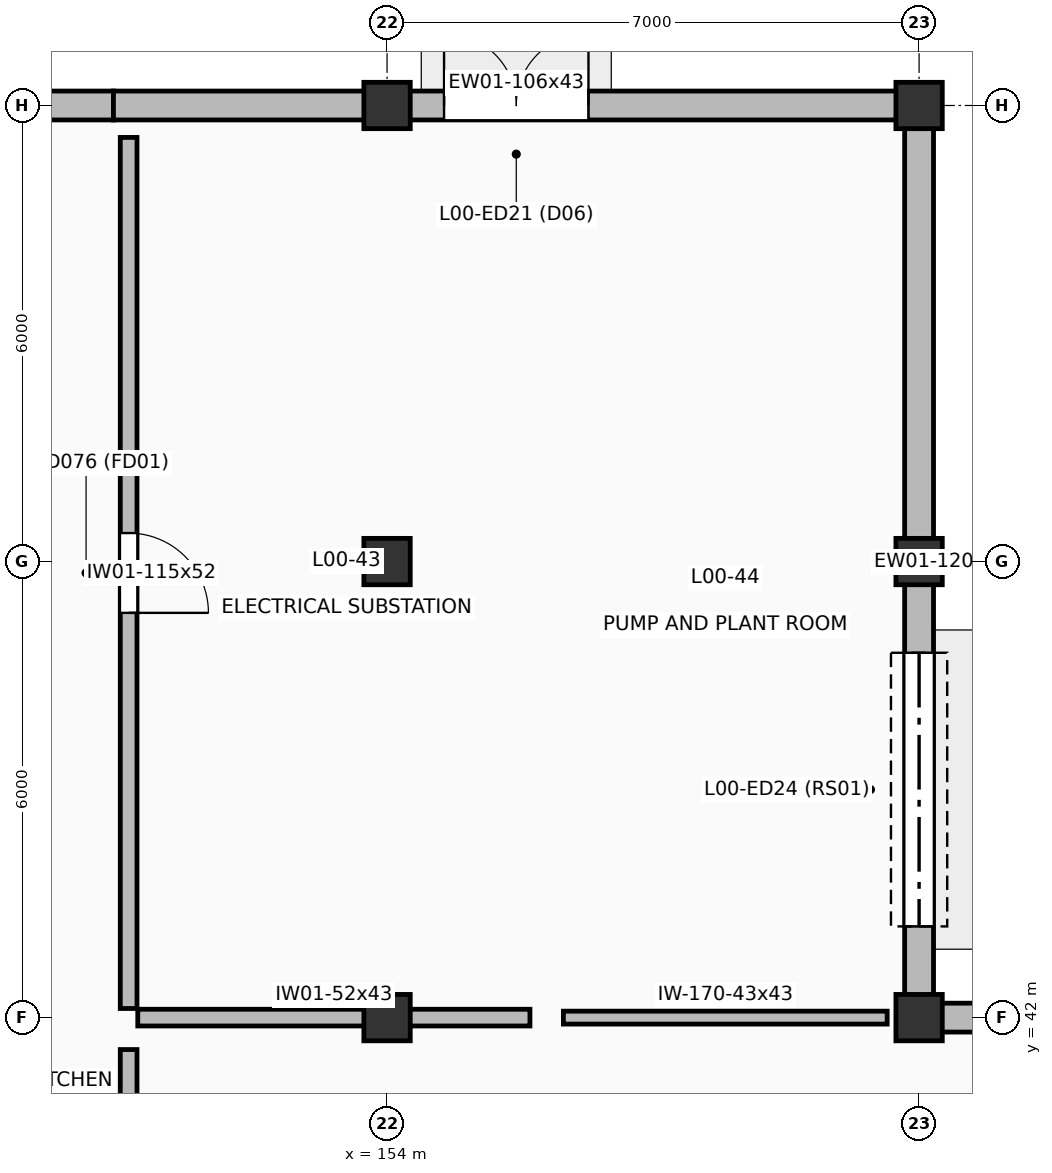
"""IFC4 building model, lengths in metres.
Left out: names, types, materials, properties, quantities, classifications, styles, units other than length and angle.
Written with IfcOpenShell. Run it as: python <this file> out.ifc"""

import sys

from ifc_helpers import new_model, si_unit, direction, frame, frame_2d, origin, origin_2d, place, context, subcontext, project, spatial, rectangle, extrude, element, fill, save


model = new_model("IFC4")
c1 = context("Model", 3, precision=1e-05, world=origin(), true_north=direction((0.0, 1.0)))
c2 = subcontext(c1, "Body", "Model", "MODEL_VIEW")
j1 = project(units=[si_unit("LENGTHUNIT", "METRE"), si_unit("PLANEANGLEUNIT", "RADIAN")], contexts=[c1])
p1 = place(None, origin())
s1 = spatial("IfcSite", under=j1, at=p1, CompositionType="ELEMENT")
p2 = place(p1, origin())
s2 = spatial("IfcBuilding", under=s1, at=p2, CompositionType="ELEMENT")
p3 = place(p2, origin())
s3 = spatial("IfcBuildingStorey", under=s2, at=p3, CompositionType="ELEMENT", Elevation=0.0)
for number, where, z_axis, x_axis in (
    (1, (154.0, 42.0, 0.0), (0.0, 0.0, 1.0), (1.0, 0.0, 0.0)),
    (2, (154.0, 48.0, 0.0), (0.0, 0.0, 1.0), (1.0, 0.0, 0.0)),
    (3, (154.0, 54.0, 0.0), (0.0, 0.0, 1.0), (1.0, 0.0, 0.0)),
    (4, (161.0, 42.0, 0.0), (0.0, 0.0, 1.0), (1.0, 0.0, 0.0)),
    (5, (161.0, 48.0, 0.0), (0.0, 0.0, 1.0), (1.0, 0.0, 0.0)),
    (6, (161.0, 54.0, 0.0), (0.0, 0.0, 1.0), (1.0, 0.0, 0.0)),
):
    element("IfcColumn", number, at=place(p3, frame(where, z_axis=z_axis, x_axis=x_axis)), inside=s3, PredefinedType="COLUMN", context=c2, shape_type="SweptSolid", body=[
        extrude(rectangle(XDim=0.61, YDim=0.61, at=origin_2d()), origin(), (0.0, 0.0, 1.0), 5.4),
    ])
p4 = place(p3, frame((140.0, 54.0, 0.0), z_axis=(0.0, 0.0, 1.0), x_axis=(1.0, 0.0, 0.0)))
e7 = element("IfcWall", 7, at=p4, inside=s3, PredefinedType="SOLIDWALL", context=c2, shape_type="SweptSolid", body=[
    extrude(rectangle(XDim=10.4, YDim=0.38, at=frame_2d((5.2, 0.0))), origin(), (0.0, 0.0, 1.0), 4.315),
])
p5 = place(p4, frame((4.2, 0.0, 0.0)))
e8 = element("IfcOpeningElement", 8, at=p5, cuts=e7, PredefinedType="OPENING", context=c2, shape_type="SweptSolid", body=[
    extrude(rectangle(XDim=2.0, YDim=2.4, at=frame_2d((1.0, 1.2))), frame((0.0, 0.2, 0.0), z_axis=(0.0, -1.0, 0.0), x_axis=(1.0, 0.0, 0.0)), (0.0, 0.0, 1.0), 0.4),
])
p6 = place(p3, frame((150.4, 54.0, 0.0), z_axis=(0.0, 0.0, 1.0), x_axis=(1.0, 0.0, 0.0)))
e9 = element("IfcWall", 9, at=p6, inside=s3, PredefinedType="SOLIDWALL", context=c2, shape_type="SweptSolid", body=[
    extrude(rectangle(XDim=10.6, YDim=0.38, at=frame_2d((5.3, 0.0))), origin(), (0.0, 0.0, 1.0), 4.315),
])
p7 = place(p6, frame((4.35, 0.0, 0.0)))
e10 = element("IfcOpeningElement", 10, at=p7, cuts=e9, PredefinedType="OPENING", context=c2, shape_type="SweptSolid", body=[
    extrude(rectangle(XDim=1.9, YDim=2.35, at=frame_2d((0.95, 1.175))), frame((0.0, 0.2, 0.0), z_axis=(0.0, -1.0, 0.0), x_axis=(1.0, 0.0, 0.0)), (0.0, 0.0, 1.0), 0.4),
])
p8 = place(p3, frame((161.0, 54.0, 0.0), z_axis=(0.0, 0.0, 1.0), x_axis=(0.0, -1.0, 0.0)))
e11 = element("IfcWall", 11, at=p8, inside=s3, PredefinedType="SOLIDWALL", context=c2, shape_type="SweptSolid", body=[
    extrude(rectangle(XDim=12.0, YDim=0.38, at=frame_2d((6.0, 0.0))), origin(), (0.0, 0.0, 1.0), 4.425),
])
p9 = place(p8, frame((7.2, 0.0, 0.0)))
e12 = element("IfcOpeningElement", 12, at=p9, cuts=e11, PredefinedType="OPENING", context=c2, shape_type="SweptSolid", body=[
    extrude(rectangle(XDim=3.6, YDim=3.6, at=frame_2d((1.8, 1.8))), frame((0.0, 0.2, 0.0), z_axis=(0.0, -1.0, 0.0), x_axis=(1.0, 0.0, 0.0)), (0.0, 0.0, 1.0), 0.4),
])
p10 = place(p3, frame((161.0, 42.0, 0.0), z_axis=(0.0, 0.0, 1.0), x_axis=(1.0, 0.0, 0.0)))
e13 = element("IfcWall", 13, at=p10, inside=s3, PredefinedType="SOLIDWALL", context=c2, shape_type="SweptSolid", body=[
    extrude(rectangle(XDim=7.0, YDim=0.38, at=frame_2d((3.5, 0.0))), origin(), (0.0, 0.0, 1.0), 4.315),
])
p11 = place(p10, frame((2.3, 0.0, 0.0)))
e14 = element("IfcOpeningElement", 14, at=p11, cuts=e13, PredefinedType="OPENING", context=c2, shape_type="SweptSolid", body=[
    extrude(rectangle(XDim=2.4, YDim=2.4, at=frame_2d((1.2, 1.2))), frame((0.0, 0.2, 0.0), z_axis=(0.0, -1.0, 0.0), x_axis=(1.0, 0.0, 0.0)), (0.0, 0.0, 1.0), 0.4),
])
p12 = place(p3, frame((150.6, 41.58, 0.0), z_axis=(0.0, 0.0, 1.0), x_axis=(0.0, -1.0, 0.0)))
e15 = element("IfcWall", 15, at=p12, inside=s3, PredefinedType="SOLIDWALL", context=c2, shape_type="SweptSolid", body=[
    extrude(rectangle(XDim=11.02, YDim=0.22, at=frame_2d((5.51, 0.0))), origin(), (0.0, 0.0, 1.0), 5.16),
])
p13 = place(p12, frame((4.985, 0.0, 0.0)))
e16 = element("IfcOpeningElement", 16, at=p13, cuts=e15, PredefinedType="OPENING", context=c2, shape_type="SweptSolid", body=[
    extrude(rectangle(XDim=1.05, YDim=2.2, at=frame_2d((0.525, 1.1))), frame((0.0, 0.12, 0.0), z_axis=(0.0, -1.0, 0.0), x_axis=(1.0, 0.0, 0.0)), (0.0, 0.0, 1.0), 0.24),
])
p14 = place(p3, frame((150.72, 42.0, 0.0), z_axis=(0.0, 0.0, 1.0), x_axis=(1.0, 0.0, 0.0)))
e17 = element("IfcWall", 17, at=p14, inside=s3, PredefinedType="SOLIDWALL", context=c2, shape_type="SweptSolid", body=[
    extrude(rectangle(XDim=5.16, YDim=0.22, at=frame_2d((2.58, 0.0))), origin(), (0.0, 0.0, 1.0), 4.315),
])
p15 = place(p3, frame((150.6, 53.58, 0.0), z_axis=(0.0, 0.0, 1.0), x_axis=(0.0, -1.0, 0.0)))
e18 = element("IfcWall", 18, at=p15, inside=s3, PredefinedType="SOLIDWALL", context=c2, shape_type="SweptSolid", body=[
    extrude(rectangle(XDim=11.46, YDim=0.22, at=frame_2d((5.73, 0.0))), origin(), (0.0, 0.0, 1.0), 5.16),
])
p16 = place(p15, frame((5.205, 0.0, 0.0)))
e19 = element("IfcOpeningElement", 19, at=p16, cuts=e18, PredefinedType="OPENING", context=c2, shape_type="SweptSolid", body=[
    extrude(rectangle(XDim=1.05, YDim=2.2, at=frame_2d((0.525, 1.1))), frame((0.0, 0.12, 0.0), z_axis=(0.0, -1.0, 0.0), x_axis=(1.0, 0.0, 0.0)), (0.0, 0.0, 1.0), 0.24),
])
p17 = place(p3, frame((156.32, 42.0, 0.0), z_axis=(0.0, 0.0, 1.0), x_axis=(1.0, 0.0, 0.0)))
e20 = element("IfcWall", 20, at=p17, inside=s3, PredefinedType="PARTITIONING", context=c2, shape_type="SweptSolid", body=[
    extrude(rectangle(XDim=4.26, YDim=0.17, at=frame_2d((2.13, 0.0))), origin(), (0.0, 0.0, 1.0), 4.315),
])
p18 = place(p7, origin())
e21 = element("IfcDoor", 21, at=p18, inside=s3, OperationType="DOUBLE_DOOR_SINGLE_SWING", PredefinedType="DOOR", context=c2, shape_type="SweptSolid", body=[
    extrude(rectangle(XDim=1.9, YDim=2.35, at=frame_2d((0.95, 1.175))), frame((0.0, 0.025, 0.0), z_axis=(0.0, -1.0, 0.0), x_axis=(1.0, 0.0, 0.0)), (0.0, 0.0, 1.0), 0.05),
])
fill(e10, e21)
p19 = place(p9, origin())
e22 = element("IfcDoor", 22, at=p19, inside=s3, OperationType="ROLLINGUP", PredefinedType="GATE", context=c2, shape_type="SweptSolid", body=[
    extrude(rectangle(XDim=3.6, YDim=3.6, at=frame_2d((1.8, 1.8))), frame((0.0, 0.025, 0.0), z_axis=(0.0, -1.0, 0.0), x_axis=(1.0, 0.0, 0.0)), (0.0, 0.0, 1.0), 0.05),
])
fill(e12, e22)
p20 = place(p16, origin())
e23 = element("IfcDoor", 23, at=p20, inside=s3, OperationType="SINGLE_SWING_RIGHT", PredefinedType="DOOR", context=c2, shape_type="SweptSolid", body=[
    extrude(rectangle(XDim=1.05, YDim=2.2, at=frame_2d((0.525, 1.1))), frame((0.0, 0.025, 0.0), z_axis=(0.0, -1.0, 0.0), x_axis=(1.0, 0.0, 0.0)), (0.0, 0.0, 1.0), 0.05),
])
fill(e19, e23)
save(model, sys.argv[1])
